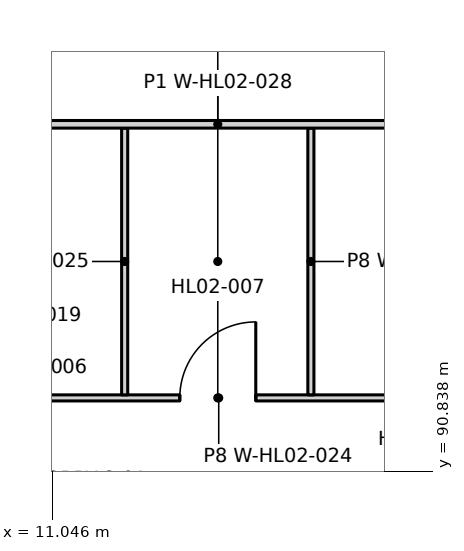
"""IFC4 building model, lengths in metres.
Left out: names, types, materials, properties, quantities, classifications, styles, units other than length and angle.
Written with IfcOpenShell. Run it as: python <this file> out.ifc"""

import sys

from ifc_helpers import new_model, si_unit, direction, frame, frame_2d, origin, place, context, subcontext, project, spatial, rectangle, extrude, element, fill, save


model = new_model("IFC4")
c1 = context("Model", 3, precision=1e-05, world=origin(), true_north=direction((0.0, 1.0)))
c2 = subcontext(c1, "Body", "Model", "MODEL_VIEW")
j1 = project(units=[si_unit("LENGTHUNIT", "METRE"), si_unit("PLANEANGLEUNIT", "RADIAN")], contexts=[c1])
p1 = place(None, origin())
s1 = spatial("IfcSite", under=j1, at=p1, CompositionType="ELEMENT")
p2 = place(p1, origin())
s2 = spatial("IfcBuilding", under=s1, at=p2, CompositionType="ELEMENT")
p3 = place(p2, frame((0.0, 0.0, 10.5)))
s3 = spatial("IfcBuildingStorey", under=s2, at=p3, CompositionType="ELEMENT", Elevation=10.5)
p4 = place(p3, frame((9.05, 91.8, 0.0), z_axis=(0.0, 0.0, 1.0), x_axis=(1.0, 0.0, 0.0)))
e1 = element("IfcWall", 1, at=p4, inside=s3, PredefinedType="PARTITIONING", context=c2, shape_type="SweptSolid", body=[
    extrude(rectangle(XDim=8.375, YDim=0.08, at=frame_2d((4.188, 0.0))), origin(), (0.0, 0.0, 1.0), 4.2),
])
p5 = place(p4, frame((0.95, 0.0, 0.0)))
e2 = element("IfcOpeningElement", 2, at=p5, cuts=e1, PredefinedType="OPENING", context=c2, shape_type="SweptSolid", body=[
    extrude(rectangle(XDim=1.0, YDim=2.1, at=frame_2d((0.5, 1.05))), frame((0.0, 0.05, 0.0), z_axis=(0.0, -1.0, 0.0), x_axis=(1.0, 0.0, 0.0)), (0.0, 0.0, 1.0), 0.1),
])
p6 = place(p4, frame((3.675, 0.0, 0.0)))
e3 = element("IfcOpeningElement", 3, at=p6, cuts=e1, PredefinedType="OPENING", context=c2, shape_type="SweptSolid", body=[
    extrude(rectangle(XDim=1.0, YDim=2.1, at=frame_2d((0.5, 1.05))), frame((0.0, 0.05, 0.0), z_axis=(0.0, -1.0, 0.0), x_axis=(1.0, 0.0, 0.0)), (0.0, 0.0, 1.0), 0.1),
])
p7 = place(p4, frame((6.4, 0.0, 0.0)))
e4 = element("IfcOpeningElement", 4, at=p7, cuts=e1, PredefinedType="OPENING", context=c2, shape_type="SweptSolid", body=[
    extrude(rectangle(XDim=1.0, YDim=2.1, at=frame_2d((0.5, 1.05))), frame((0.0, 0.05, 0.0), z_axis=(0.0, -1.0, 0.0), x_axis=(1.0, 0.0, 0.0)), (0.0, 0.0, 1.0), 0.1),
])
for number, where, z_axis, x_axis in (
    (5, (12.0, 91.84, 0.0), (0.0, 0.0, 1.0), (0.0, 1.0, 0.0)),
    (6, (14.45, 91.84, 0.0), (0.0, 0.0, 1.0), (0.0, 1.0, 0.0)),
):
    element("IfcWall", number, at=place(p3, frame(where, z_axis=z_axis, x_axis=x_axis)), inside=s3, PredefinedType="PARTITIONING", context=c2, shape_type="SweptSolid", body=[
        extrude(rectangle(XDim=3.51, YDim=0.08, at=frame_2d((1.755, 0.0))), origin(), (0.0, 0.0, 1.0), 4.2),
    ])
p8 = place(p3, frame((8.95, 95.4, 0.0), z_axis=(0.0, 0.0, 1.0), x_axis=(1.0, 0.0, 0.0)))
e7 = element("IfcWall", 7, at=p8, inside=s3, PredefinedType="PARTITIONING", context=c2, shape_type="SweptSolid", body=[
    extrude(rectangle(XDim=8.55, YDim=0.1, at=frame_2d((4.275, 0.0))), origin(), (0.0, 0.0, 1.0), 4.2),
])
p9 = place(p6, origin())
e8 = element("IfcDoor", 8, at=p9, inside=s3, OperationType="SINGLE_SWING_RIGHT", PredefinedType="DOOR", context=c2, shape_type="SweptSolid", body=[
    extrude(rectangle(XDim=1.0, YDim=2.1, at=frame_2d((0.5, 1.05))), frame((0.0, 0.025, 0.0), z_axis=(0.0, -1.0, 0.0), x_axis=(1.0, 0.0, 0.0)), (0.0, 0.0, 1.0), 0.05),
])
fill(e3, e8)
save(model, sys.argv[1])
